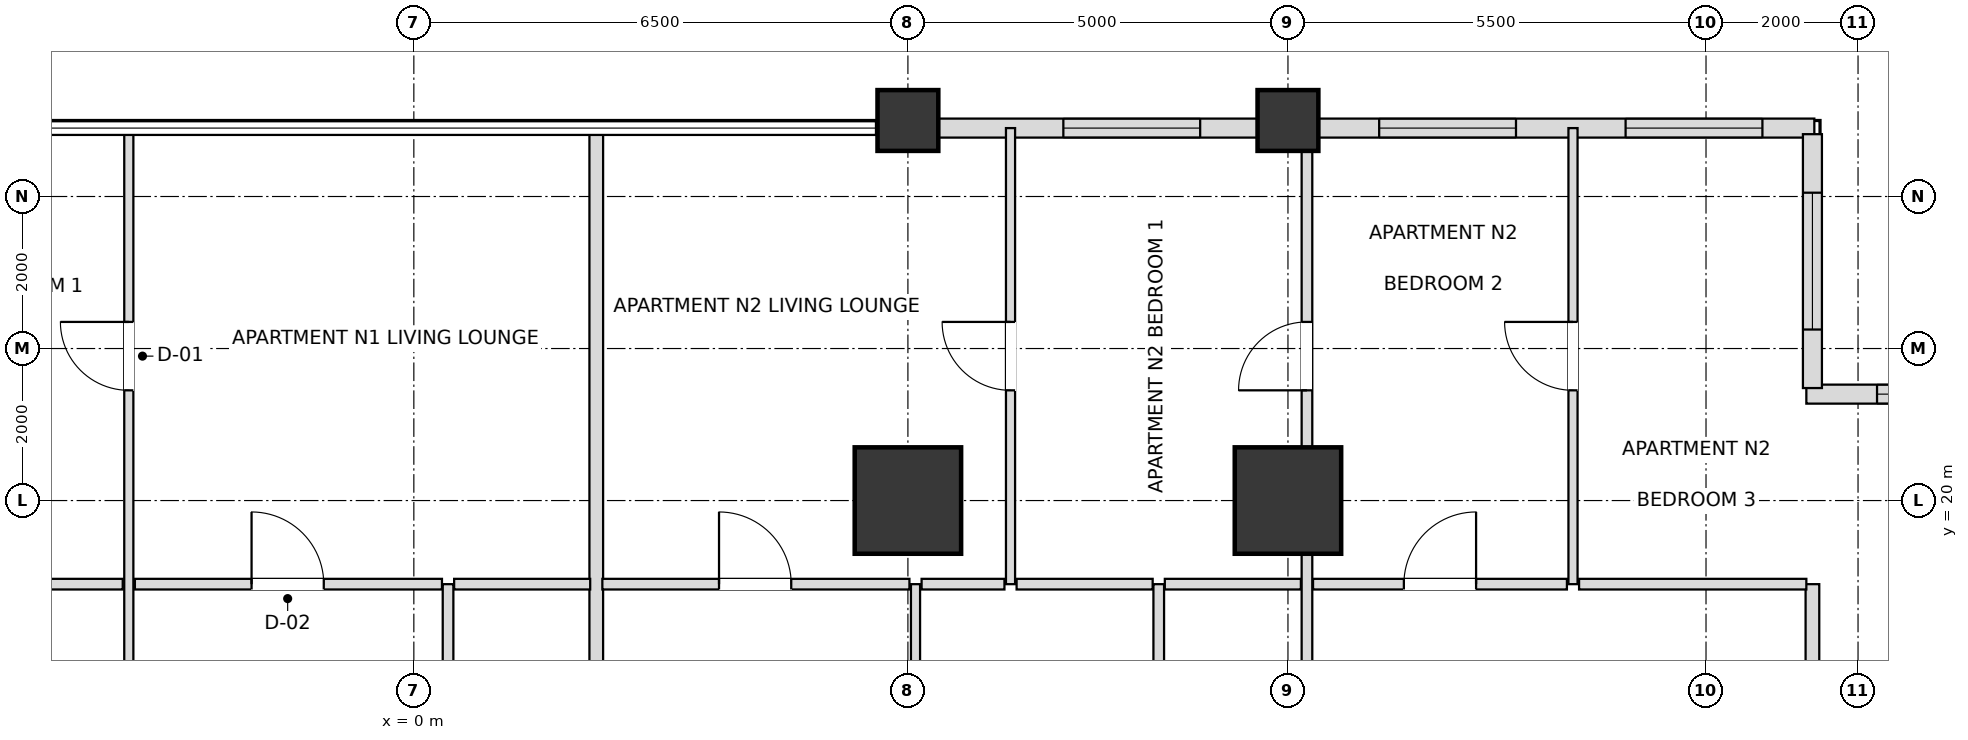
"""IFC4 building model, lengths in metres.
Left out: names, types, materials, properties, quantities, classifications, styles, units other than length and angle.
Written with IfcOpenShell. Run it as: python <this file> out.ifc"""

import sys

from ifc_helpers import new_model, si_unit, direction, frame, frame_2d, origin, origin_2d, place, context, subcontext, project, spatial, rectangle, extrude, element, fill, save


model = new_model("IFC4")
c1 = context("Model", 3, precision=1e-05, world=origin(), true_north=direction((0.0, 1.0)))
c2 = subcontext(c1, "Body", "Model", "MODEL_VIEW")
j1 = project(units=[si_unit("LENGTHUNIT", "METRE"), si_unit("PLANEANGLEUNIT", "RADIAN")], contexts=[c1])
p1 = place(None, origin())
s1 = spatial("IfcSite", under=j1, at=p1, CompositionType="ELEMENT")
p2 = place(p1, origin())
s2 = spatial("IfcBuilding", under=s1, at=p2, CompositionType="ELEMENT")
p3 = place(p2, frame((0.0, 0.0, 57.6)))
s3 = spatial("IfcBuildingStorey", under=s2, at=p3, CompositionType="ELEMENT", Elevation=57.6)
for number, where, z_axis, x_axis in (
    (1, (11.5, 20.0, 0.0), (0.0, 0.0, 1.0), (1.0, 0.0, 0.0)),
    (2, (6.5, 20.0, 0.0), (0.0, 0.0, 1.0), (1.0, 0.0, 0.0)),
):
    element("IfcColumn", number, at=place(p3, frame(where, z_axis=z_axis, x_axis=x_axis)), inside=s3, PredefinedType="USERDEFINED", context=c2, shape_type="SweptSolid", body=[
        extrude(rectangle(XDim=1.4, YDim=1.4, at=origin_2d()), origin(), (0.0, 0.0, 1.0), 3.6),
    ])
for number, where, z_axis, x_axis in (
    (3, (6.5, 25.0, 0.0), (0.0, 0.0, 1.0), (1.0, 0.0, 0.0)),
    (4, (11.5, 25.0, 0.0), (0.0, 0.0, 1.0), (1.0, 0.0, 0.0)),
):
    element("IfcColumn", number, at=place(p3, frame(where, z_axis=z_axis, x_axis=x_axis)), inside=s3, PredefinedType="COLUMN", context=c2, shape_type="SweptSolid", body=[
        extrude(rectangle(XDim=0.8, YDim=0.8, at=origin_2d()), origin(), (0.0, 0.0, 1.0), 3.6),
    ])
p4 = place(p3, frame((18.425, 24.9, 0.0), z_axis=(0.0, 0.0, 1.0), x_axis=(-1.0, 0.0, 0.0)))
e5 = element("IfcWall", 5, at=p4, inside=s3, PredefinedType="SOLIDWALL", context=c2, shape_type="SweptSolid", body=[
    extrude(rectangle(XDim=6.53, YDim=0.25, at=frame_2d((3.265, 0.0))), origin(), (0.0, 0.0, 1.0), 2.736),
])
p5 = place(p4, frame((0.683, 0.0, 0.72)))
e6 = element("IfcOpeningElement", 6, at=p5, cuts=e5, PredefinedType="OPENING", context=c2, shape_type="SweptSolid", body=[
    extrude(rectangle(XDim=1.8, YDim=1.68, at=frame_2d((0.9, 0.84))), frame((0.0, 0.135, 0.0), z_axis=(0.0, -1.0, 0.0), x_axis=(1.0, 0.0, 0.0)), (0.0, 0.0, 1.0), 0.27),
])
p6 = place(p4, frame((3.925, 0.0, 0.72)))
e7 = element("IfcOpeningElement", 7, at=p6, cuts=e5, PredefinedType="OPENING", context=c2, shape_type="SweptSolid", body=[
    extrude(rectangle(XDim=1.8, YDim=1.68, at=frame_2d((0.9, 0.84))), frame((0.0, 0.135, 0.0), z_axis=(0.0, -1.0, 0.0), x_axis=(1.0, 0.0, 0.0)), (0.0, 0.0, 1.0), 0.27),
])
p7 = place(p3, frame((11.105, 24.9, 0.0), z_axis=(0.0, 0.0, 1.0), x_axis=(-1.0, 0.0, 0.0)))
e8 = element("IfcWall", 8, at=p7, inside=s3, PredefinedType="SOLIDWALL", context=c2, shape_type="SweptSolid", body=[
    extrude(rectangle(XDim=4.21, YDim=0.25, at=frame_2d((2.105, 0.0))), origin(), (0.0, 0.0, 1.0), 2.736),
])
p8 = place(p7, frame((0.76, 0.0, 0.72)))
e9 = element("IfcOpeningElement", 9, at=p8, cuts=e8, PredefinedType="OPENING", context=c2, shape_type="SweptSolid", body=[
    extrude(rectangle(XDim=1.8, YDim=1.68, at=frame_2d((0.9, 0.84))), frame((0.0, 0.135, 0.0), z_axis=(0.0, -1.0, 0.0), x_axis=(1.0, 0.0, 0.0)), (0.0, 0.0, 1.0), 0.27),
])
p9 = place(p3, frame((21.98, 21.4, 0.0), z_axis=(0.0, 0.0, 1.0), x_axis=(-1.0, 0.0, 0.0)))
e10 = element("IfcWall", 10, at=p9, inside=s3, PredefinedType="SOLIDWALL", context=c2, shape_type="SweptSolid", body=[
    extrude(rectangle(XDim=3.66, YDim=0.25, at=frame_2d((1.83, 0.0))), origin(), (0.0, 0.0, 1.0), 2.736),
])
p10 = place(p9, frame((0.93, 0.0, 0.72)))
e11 = element("IfcOpeningElement", 11, at=p10, cuts=e10, PredefinedType="OPENING", context=c2, shape_type="SweptSolid", body=[
    extrude(rectangle(XDim=1.8, YDim=1.68, at=frame_2d((0.9, 0.84))), frame((0.0, 0.135, 0.0), z_axis=(0.0, -1.0, 0.0), x_axis=(1.0, 0.0, 0.0)), (0.0, 0.0, 1.0), 0.27),
])
p11 = place(p3, frame((18.4, 21.48, 0.0), z_axis=(0.0, 0.0, 1.0), x_axis=(0.0, 1.0, 0.0)))
e12 = element("IfcWall", 12, at=p11, inside=s3, PredefinedType="SOLIDWALL", context=c2, shape_type="SweptSolid", body=[
    extrude(rectangle(XDim=3.34, YDim=0.25, at=frame_2d((1.67, 0.0))), origin(), (0.0, 0.0, 1.0), 2.736),
])
p12 = place(p11, frame((0.77, 0.0, 0.72)))
e13 = element("IfcOpeningElement", 13, at=p12, cuts=e12, PredefinedType="OPENING", context=c2, shape_type="SweptSolid", body=[
    extrude(rectangle(XDim=1.8, YDim=1.68, at=frame_2d((0.9, 0.84))), frame((0.0, 0.135, 0.0), z_axis=(0.0, -1.0, 0.0), x_axis=(1.0, 0.0, 0.0)), (0.0, 0.0, 1.0), 0.27),
])
p13 = place(p3, frame((-3.75, 9.3, 0.0), z_axis=(0.0, 0.0, 1.0), x_axis=(0.0, 1.0, 0.0)))
e14 = element("IfcWall", 14, at=p13, inside=s3, PredefinedType="PARTITIONING", context=c2, shape_type="SweptSolid", body=[
    extrude(rectangle(XDim=15.6, YDim=0.12, at=frame_2d((7.8, 0.0))), origin(), (0.0, 0.0, 1.0), 2.816),
])
p14 = place(p13, frame((4.325, 0.0, 0.0)))
e15 = element("IfcOpeningElement", 15, at=p14, cuts=e14, PredefinedType="OPENING", context=c2, shape_type="SweptSolid", body=[
    extrude(rectangle(XDim=0.95, YDim=2.1, at=frame_2d((0.475, 1.05))), frame((0.0, 0.07, 0.0), z_axis=(0.0, -1.0, 0.0), x_axis=(1.0, 0.0, 0.0)), (0.0, 0.0, 1.0), 0.14),
])
p15 = place(p13, frame((12.15, 0.0, 0.0)))
e16 = element("IfcOpeningElement", 16, at=p15, cuts=e14, PredefinedType="OPENING", context=c2, shape_type="SweptSolid", body=[
    extrude(rectangle(XDim=0.9, YDim=2.1, at=frame_2d((0.45, 1.05))), frame((0.0, 0.07, 0.0), z_axis=(0.0, -1.0, 0.0), x_axis=(1.0, 0.0, 0.0)), (0.0, 0.0, 1.0), 0.14),
])
p16 = place(p3, frame((0.45, 9.3, 0.0), z_axis=(0.0, 0.0, 1.0), x_axis=(0.0, 1.0, 0.0)))
e17 = element("IfcWall", 17, at=p16, inside=s3, PredefinedType="PARTITIONING", context=c2, shape_type="SweptSolid", body=[
    extrude(rectangle(XDim=9.6, YDim=0.14, at=frame_2d((4.8, 0.0))), origin(), (0.0, 0.0, 1.0), 2.948),
])
p17 = place(p16, frame((4.35, 0.0, 0.0)))
e18 = element("IfcOpeningElement", 18, at=p17, cuts=e17, PredefinedType="OPENING", context=c2, shape_type="SweptSolid", body=[
    extrude(rectangle(XDim=0.9, YDim=2.1, at=frame_2d((0.45, 1.05))), frame((0.0, 0.08, 0.0), z_axis=(0.0, -1.0, 0.0), x_axis=(1.0, 0.0, 0.0)), (0.0, 0.0, 1.0), 0.16),
])
p18 = place(p3, frame((2.4, 9.3, 0.0), z_axis=(0.0, 0.0, 1.0), x_axis=(0.0, 1.0, 0.0)))
e19 = element("IfcWall", 19, at=p18, inside=s3, PredefinedType="PARTITIONING", context=c2, shape_type="SweptSolid", body=[
    extrude(rectangle(XDim=15.6, YDim=0.18, at=frame_2d((7.8, 0.0))), origin(), (0.0, 0.0, 1.0), 2.816),
])
p19 = place(p3, frame((6.6, 9.3, 0.0), z_axis=(0.0, 0.0, 1.0), x_axis=(0.0, 1.0, 0.0)))
e20 = element("IfcWall", 20, at=p19, inside=s3, PredefinedType="PARTITIONING", context=c2, shape_type="SweptSolid", body=[
    extrude(rectangle(XDim=9.6, YDim=0.12, at=frame_2d((4.8, 0.0))), origin(), (0.0, 0.0, 1.0), 2.816),
])
p20 = place(p19, frame((4.325, 0.0, 0.0)))
e21 = element("IfcOpeningElement", 21, at=p20, cuts=e20, PredefinedType="OPENING", context=c2, shape_type="SweptSolid", body=[
    extrude(rectangle(XDim=0.95, YDim=2.1, at=frame_2d((0.475, 1.05))), frame((0.0, 0.07, 0.0), z_axis=(0.0, -1.0, 0.0), x_axis=(1.0, 0.0, 0.0)), (0.0, 0.0, 1.0), 0.14),
])
p21 = place(p3, frame((7.85, 18.9, 0.0), z_axis=(0.0, 0.0, 1.0), x_axis=(0.0, 1.0, 0.0)))
e22 = element("IfcWall", 22, at=p21, inside=s3, PredefinedType="PARTITIONING", context=c2, shape_type="SweptSolid", body=[
    extrude(rectangle(XDim=6.0, YDim=0.12, at=frame_2d((3.0, 0.0))), origin(), (0.0, 0.0, 1.0), 2.816),
])
p22 = place(p21, frame((2.55, 0.0, 0.0)))
e23 = element("IfcOpeningElement", 23, at=p22, cuts=e22, PredefinedType="OPENING", context=c2, shape_type="SweptSolid", body=[
    extrude(rectangle(XDim=0.9, YDim=2.1, at=frame_2d((0.45, 1.05))), frame((0.0, 0.07, 0.0), z_axis=(0.0, -1.0, 0.0), x_axis=(1.0, 0.0, 0.0)), (0.0, 0.0, 1.0), 0.14),
])
p23 = place(p3, frame((9.8, 9.3, 0.0), z_axis=(0.0, 0.0, 1.0), x_axis=(0.0, 1.0, 0.0)))
e24 = element("IfcWall", 24, at=p23, inside=s3, PredefinedType="PARTITIONING", context=c2, shape_type="SweptSolid", body=[
    extrude(rectangle(XDim=9.6, YDim=0.14, at=frame_2d((4.8, 0.0))), origin(), (0.0, 0.0, 1.0), 2.816),
])
p24 = place(p23, frame((4.35, 0.0, 0.0)))
e25 = element("IfcOpeningElement", 25, at=p24, cuts=e24, PredefinedType="OPENING", context=c2, shape_type="SweptSolid", body=[
    extrude(rectangle(XDim=0.9, YDim=2.1, at=frame_2d((0.45, 1.05))), frame((0.0, 0.08, 0.0), z_axis=(0.0, -1.0, 0.0), x_axis=(1.0, 0.0, 0.0)), (0.0, 0.0, 1.0), 0.16),
])
p25 = place(p3, frame((11.75, 9.3, 0.0), z_axis=(0.0, 0.0, 1.0), x_axis=(0.0, 1.0, 0.0)))
e26 = element("IfcWall", 26, at=p25, inside=s3, PredefinedType="PARTITIONING", context=c2, shape_type="SweptSolid", body=[
    extrude(rectangle(XDim=15.6, YDim=0.14, at=frame_2d((7.8, 0.0))), origin(), (0.0, 0.0, 1.0), 2.736),
])
p26 = place(p25, frame((12.15, 0.0, 0.0)))
e27 = element("IfcOpeningElement", 27, at=p26, cuts=e26, PredefinedType="OPENING", context=c2, shape_type="SweptSolid", body=[
    extrude(rectangle(XDim=0.9, YDim=2.1, at=frame_2d((0.45, 1.05))), frame((0.0, 0.08, 0.0), z_axis=(0.0, -1.0, 0.0), x_axis=(1.0, 0.0, 0.0)), (0.0, 0.0, 1.0), 0.16),
])
p27 = place(p3, frame((15.25, 18.9, 0.0), z_axis=(0.0, 0.0, 1.0), x_axis=(0.0, 1.0, 0.0)))
e28 = element("IfcWall", 28, at=p27, inside=s3, PredefinedType="PARTITIONING", context=c2, shape_type="SweptSolid", body=[
    extrude(rectangle(XDim=6.0, YDim=0.12, at=frame_2d((3.0, 0.0))), origin(), (0.0, 0.0, 1.0), 2.736),
])
p28 = place(p27, frame((2.55, 0.0, 0.0)))
e29 = element("IfcOpeningElement", 29, at=p28, cuts=e28, PredefinedType="OPENING", context=c2, shape_type="SweptSolid", body=[
    extrude(rectangle(XDim=0.9, YDim=2.1, at=frame_2d((0.45, 1.05))), frame((0.0, 0.07, 0.0), z_axis=(0.0, -1.0, 0.0), x_axis=(1.0, 0.0, 0.0)), (0.0, 0.0, 1.0), 0.14),
])
p29 = place(p3, frame((18.4, 9.3, 0.0), z_axis=(0.0, 0.0, 1.0), x_axis=(0.0, 1.0, 0.0)))
e30 = element("IfcWall", 30, at=p29, inside=s3, PredefinedType="PARTITIONING", context=c2, shape_type="SweptSolid", body=[
    extrude(rectangle(XDim=9.6, YDim=0.18, at=frame_2d((4.8, 0.0))), origin(), (0.0, 0.0, 1.0), 2.736),
])
p30 = place(p3, frame((-6.87, 18.9, 0.0), z_axis=(0.0, 0.0, 1.0), x_axis=(1.0, 0.0, 0.0)))
e31 = element("IfcWall", 31, at=p30, inside=s3, PredefinedType="PARTITIONING", context=c2, shape_type="SweptSolid", body=[
    extrude(rectangle(XDim=3.04, YDim=0.14, at=frame_2d((1.52, 0.0))), origin(), (0.0, 0.0, 1.0), 2.816),
])
p31 = place(p3, frame((-3.67, 18.9, 0.0), z_axis=(0.0, 0.0, 1.0), x_axis=(1.0, 0.0, 0.0)))
e32 = element("IfcWall", 32, at=p31, inside=s3, PredefinedType="PARTITIONING", context=c2, shape_type="SweptSolid", body=[
    extrude(rectangle(XDim=4.04, YDim=0.14, at=frame_2d((2.02, 0.0))), origin(), (0.0, 0.0, 1.0), 3.38),
])
p32 = place(p31, frame((1.535, 0.0, 0.0)))
e33 = element("IfcOpeningElement", 33, at=p32, cuts=e32, PredefinedType="OPENING", context=c2, shape_type="SweptSolid", body=[
    extrude(rectangle(XDim=0.95, YDim=2.1, at=frame_2d((0.475, 1.05))), frame((0.0, 0.08, 0.0), z_axis=(0.0, -1.0, 0.0), x_axis=(1.0, 0.0, 0.0)), (0.0, 0.0, 1.0), 0.16),
])
p33 = place(p3, frame((0.53, 18.9, 0.0), z_axis=(0.0, 0.0, 1.0), x_axis=(1.0, 0.0, 0.0)))
e34 = element("IfcWall", 34, at=p33, inside=s3, PredefinedType="PARTITIONING", context=c2, shape_type="SweptSolid", body=[
    extrude(rectangle(XDim=1.79, YDim=0.14, at=frame_2d((0.895, 0.0))), origin(), (0.0, 0.0, 1.0), 3.38),
])
p34 = place(p3, frame((2.48, 18.9, 0.0), z_axis=(0.0, 0.0, 1.0), x_axis=(1.0, 0.0, 0.0)))
e35 = element("IfcWall", 35, at=p34, inside=s3, PredefinedType="PARTITIONING", context=c2, shape_type="SweptSolid", body=[
    extrude(rectangle(XDim=4.04, YDim=0.14, at=frame_2d((2.02, 0.0))), origin(), (0.0, 0.0, 1.0), 3.38),
])
p35 = place(p34, frame((1.535, 0.0, 0.0)))
e36 = element("IfcOpeningElement", 36, at=p35, cuts=e35, PredefinedType="OPENING", context=c2, shape_type="SweptSolid", body=[
    extrude(rectangle(XDim=0.95, YDim=2.1, at=frame_2d((0.475, 1.05))), frame((0.0, 0.08, 0.0), z_axis=(0.0, -1.0, 0.0), x_axis=(1.0, 0.0, 0.0)), (0.0, 0.0, 1.0), 0.16),
])
p36 = place(p3, frame((6.68, 18.9, 0.0), z_axis=(0.0, 0.0, 1.0), x_axis=(1.0, 0.0, 0.0)))
e37 = element("IfcWall", 37, at=p36, inside=s3, PredefinedType="PARTITIONING", context=c2, shape_type="SweptSolid", body=[
    extrude(rectangle(XDim=1.09, YDim=0.14, at=frame_2d((0.545, 0.0))), origin(), (0.0, 0.0, 1.0), 3.38),
])
p37 = place(p3, frame((7.93, 18.9, 0.0), z_axis=(0.0, 0.0, 1.0), x_axis=(1.0, 0.0, 0.0)))
e38 = element("IfcWall", 38, at=p37, inside=s3, PredefinedType="PARTITIONING", context=c2, shape_type="SweptSolid", body=[
    extrude(rectangle(XDim=1.79, YDim=0.14, at=frame_2d((0.895, 0.0))), origin(), (0.0, 0.0, 1.0), 3.38),
])
p38 = place(p3, frame((9.88, 18.9, 0.0), z_axis=(0.0, 0.0, 1.0), x_axis=(1.0, 0.0, 0.0)))
e39 = element("IfcWall", 39, at=p38, inside=s3, PredefinedType="PARTITIONING", context=c2, shape_type="SweptSolid", body=[
    extrude(rectangle(XDim=1.79, YDim=0.14, at=frame_2d((0.895, 0.0))), origin(), (0.0, 0.0, 1.0), 2.736),
])
p39 = place(p3, frame((11.83, 18.9, 0.0), z_axis=(0.0, 0.0, 1.0), x_axis=(1.0, 0.0, 0.0)))
e40 = element("IfcWall", 40, at=p39, inside=s3, PredefinedType="PARTITIONING", context=c2, shape_type="SweptSolid", body=[
    extrude(rectangle(XDim=3.34, YDim=0.14, at=frame_2d((1.67, 0.0))), origin(), (0.0, 0.0, 1.0), 2.736),
])
p40 = place(p39, frame((1.195, 0.0, 0.0)))
e41 = element("IfcOpeningElement", 41, at=p40, cuts=e40, PredefinedType="OPENING", context=c2, shape_type="SweptSolid", body=[
    extrude(rectangle(XDim=0.95, YDim=2.1, at=frame_2d((0.475, 1.05))), frame((0.0, 0.08, 0.0), z_axis=(0.0, -1.0, 0.0), x_axis=(1.0, 0.0, 0.0)), (0.0, 0.0, 1.0), 0.16),
])
p41 = place(p3, frame((15.33, 18.9, 0.0), z_axis=(0.0, 0.0, 1.0), x_axis=(1.0, 0.0, 0.0)))
e42 = element("IfcWall", 42, at=p41, inside=s3, PredefinedType="PARTITIONING", context=c2, shape_type="SweptSolid", body=[
    extrude(rectangle(XDim=2.99, YDim=0.14, at=frame_2d((1.495, 0.0))), origin(), (0.0, 0.0, 1.0), 2.736),
])
p42 = place(p5, origin())
e43 = element("IfcWindow", 43, at=p42, inside=s3, PartitioningType="SINGLE_PANEL", PredefinedType="WINDOW", context=c2, shape_type="SweptSolid", body=[
    extrude(rectangle(XDim=1.8, YDim=1.68, at=frame_2d((0.9, 0.84))), frame((0.0, 0.03, 0.0), z_axis=(0.0, -1.0, 0.0), x_axis=(1.0, 0.0, 0.0)), (0.0, 0.0, 1.0), 0.06),
])
fill(e6, e43)
p43 = place(p6, origin())
e44 = element("IfcWindow", 44, at=p43, inside=s3, PartitioningType="SINGLE_PANEL", PredefinedType="WINDOW", context=c2, shape_type="SweptSolid", body=[
    extrude(rectangle(XDim=1.8, YDim=1.68, at=frame_2d((0.9, 0.84))), frame((0.0, 0.03, 0.0), z_axis=(0.0, -1.0, 0.0), x_axis=(1.0, 0.0, 0.0)), (0.0, 0.0, 1.0), 0.06),
])
fill(e7, e44)
p44 = place(p8, origin())
e45 = element("IfcWindow", 45, at=p44, inside=s3, PartitioningType="SINGLE_PANEL", PredefinedType="WINDOW", context=c2, shape_type="SweptSolid", body=[
    extrude(rectangle(XDim=1.8, YDim=1.68, at=frame_2d((0.9, 0.84))), frame((0.0, 0.03, 0.0), z_axis=(0.0, -1.0, 0.0), x_axis=(1.0, 0.0, 0.0)), (0.0, 0.0, 1.0), 0.06),
])
fill(e9, e45)
p45 = place(p10, origin())
e46 = element("IfcWindow", 46, at=p45, inside=s3, PartitioningType="SINGLE_PANEL", PredefinedType="WINDOW", context=c2, shape_type="SweptSolid", body=[
    extrude(rectangle(XDim=1.8, YDim=1.68, at=frame_2d((0.9, 0.84))), frame((0.0, 0.03, 0.0), z_axis=(0.0, -1.0, 0.0), x_axis=(1.0, 0.0, 0.0)), (0.0, 0.0, 1.0), 0.06),
])
fill(e11, e46)
p46 = place(p12, origin())
e47 = element("IfcWindow", 47, at=p46, inside=s3, PartitioningType="SINGLE_PANEL", PredefinedType="WINDOW", context=c2, shape_type="SweptSolid", body=[
    extrude(rectangle(XDim=1.8, YDim=1.68, at=frame_2d((0.9, 0.84))), frame((0.0, 0.03, 0.0), z_axis=(0.0, -1.0, 0.0), x_axis=(1.0, 0.0, 0.0)), (0.0, 0.0, 1.0), 0.06),
])
fill(e13, e47)
p47 = place(p32, origin())
e48 = element("IfcDoor", 48, at=p47, inside=s3, OperationType="SINGLE_SWING_LEFT", PredefinedType="DOOR", context=c2, shape_type="SweptSolid", body=[
    extrude(rectangle(XDim=0.95, YDim=2.1, at=frame_2d((0.475, 1.05))), frame((0.0, 0.025, 0.0), z_axis=(0.0, -1.0, 0.0), x_axis=(1.0, 0.0, 0.0)), (0.0, 0.0, 1.0), 0.05),
])
fill(e33, e48)
p48 = place(p15, origin())
e49 = element("IfcDoor", 49, at=p48, inside=s3, OperationType="SINGLE_SWING_RIGHT", PredefinedType="DOOR", context=c2, shape_type="SweptSolid", body=[
    extrude(rectangle(XDim=0.9, YDim=2.1, at=frame_2d((0.45, 1.05))), frame((0.0, 0.025, 0.0), z_axis=(0.0, -1.0, 0.0), x_axis=(1.0, 0.0, 0.0)), (0.0, 0.0, 1.0), 0.05),
])
fill(e16, e49)
p49 = place(p40, origin())
e50 = element("IfcDoor", 50, at=p49, inside=s3, OperationType="SINGLE_SWING_RIGHT", PredefinedType="DOOR", context=c2, shape_type="SweptSolid", body=[
    extrude(rectangle(XDim=0.95, YDim=2.1, at=frame_2d((0.475, 1.05))), frame((0.0, 0.025, 0.0), z_axis=(0.0, -1.0, 0.0), x_axis=(1.0, 0.0, 0.0)), (0.0, 0.0, 1.0), 0.05),
])
fill(e41, e50)
p50 = place(p35, origin())
e51 = element("IfcDoor", 51, at=p50, inside=s3, OperationType="SINGLE_SWING_LEFT", PredefinedType="DOOR", context=c2, shape_type="SweptSolid", body=[
    extrude(rectangle(XDim=0.95, YDim=2.1, at=frame_2d((0.475, 1.05))), frame((0.0, 0.025, 0.0), z_axis=(0.0, -1.0, 0.0), x_axis=(1.0, 0.0, 0.0)), (0.0, 0.0, 1.0), 0.05),
])
fill(e36, e51)
p51 = place(p22, origin())
e52 = element("IfcDoor", 52, at=p51, inside=s3, OperationType="SINGLE_SWING_RIGHT", PredefinedType="DOOR", context=c2, shape_type="SweptSolid", body=[
    extrude(rectangle(XDim=0.9, YDim=2.1, at=frame_2d((0.45, 1.05))), frame((0.0, 0.025, 0.0), z_axis=(0.0, -1.0, 0.0), x_axis=(1.0, 0.0, 0.0)), (0.0, 0.0, 1.0), 0.05),
])
fill(e23, e52)
p52 = place(p26, origin())
e53 = element("IfcDoor", 53, at=p52, inside=s3, OperationType="SINGLE_SWING_LEFT", PredefinedType="DOOR", context=c2, shape_type="SweptSolid", body=[
    extrude(rectangle(XDim=0.9, YDim=2.1, at=frame_2d((0.45, 1.05))), frame((0.0, 0.025, 0.0), z_axis=(0.0, -1.0, 0.0), x_axis=(1.0, 0.0, 0.0)), (0.0, 0.0, 1.0), 0.05),
])
fill(e27, e53)
p53 = place(p28, origin())
e54 = element("IfcDoor", 54, at=p53, inside=s3, OperationType="SINGLE_SWING_RIGHT", PredefinedType="DOOR", context=c2, shape_type="SweptSolid", body=[
    extrude(rectangle(XDim=0.9, YDim=2.1, at=frame_2d((0.45, 1.05))), frame((0.0, 0.025, 0.0), z_axis=(0.0, -1.0, 0.0), x_axis=(1.0, 0.0, 0.0)), (0.0, 0.0, 1.0), 0.05),
])
fill(e29, e54)
save(model, sys.argv[1])
